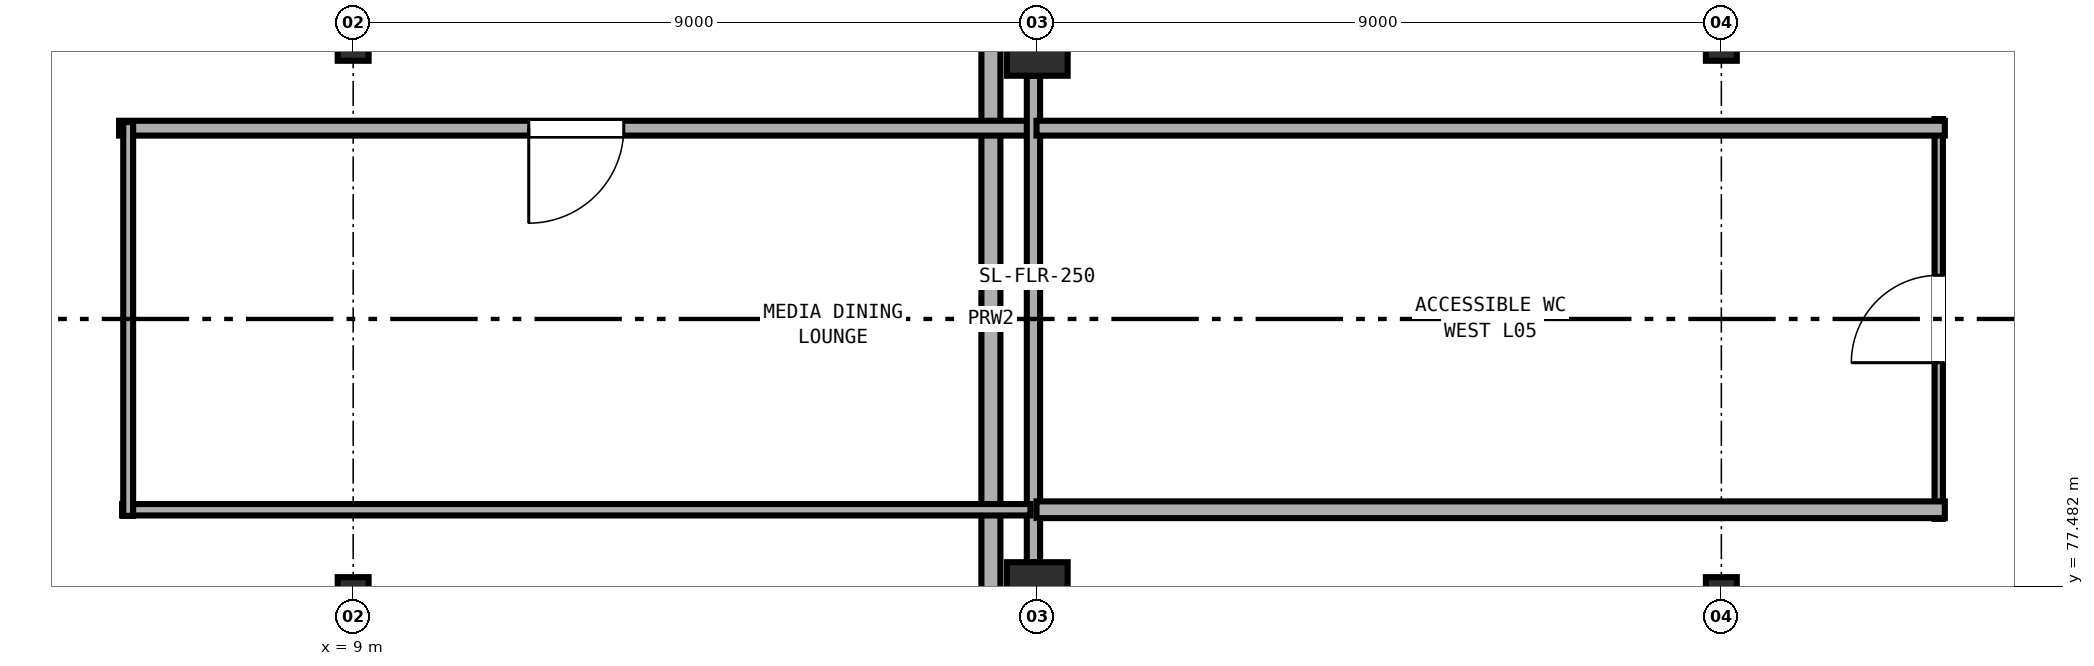
"""IFC4 building model, lengths in metres.
Left out: names, types, materials, properties, quantities, classifications, styles, units other than length and angle.
Written with IfcOpenShell. Run it as: python <this file> out.ifc"""

import sys

from ifc_helpers import new_model, si_unit, direction, frame, frame_2d, origin, origin_2d, place, context, subcontext, project, spatial, rectangle, hollow_circle, extrude, element, fill, save


model = new_model("IFC4")
c1 = context("Model", 3, precision=1e-05, world=origin(), true_north=direction((0.0, 1.0)))
c2 = subcontext(c1, "Body", "Model", "MODEL_VIEW")
j1 = project(units=[si_unit("LENGTHUNIT", "METRE"), si_unit("PLANEANGLEUNIT", "RADIAN")], contexts=[c1])
p1 = place(None, origin())
s1 = spatial("IfcSite", under=j1, at=p1, CompositionType="ELEMENT")
p2 = place(p1, origin())
s2 = spatial("IfcBuilding", under=s1, at=p2, CompositionType="ELEMENT")
p3 = place(p2, frame((0.0, 0.0, 24.0)))
s3 = spatial("IfcBuildingStorey", under=s2, at=p3, CompositionType="ELEMENT", Elevation=24.0)
for number, where, z_axis, x_axis in (
    (1, (9.0, 77.4, 0.0), (0.0, 0.0, 1.0), (1.0, 0.0, 0.0)),
    (2, (9.0, 84.6, 0.0), (0.0, 0.0, 1.0), (1.0, 0.0, 0.0)),
):
    element("IfcColumn", number, at=place(p3, frame(where, z_axis=z_axis, x_axis=x_axis)), inside=s3, PredefinedType="COLUMN", context=c2, shape_type="SweptSolid", body=[
        extrude(hollow_circle(Radius=0.203, WallThickness=0.014, at=origin_2d()), origin(), (0.0, 0.0, 1.0), 4.8),
    ])
for number, where, z_axis, x_axis in (
    (3, (18.0, 77.4, 0.0), (0.0, 0.0, 1.0), (1.0, 0.0, 0.0)),
    (4, (18.0, 84.6, 0.0), (0.0, 0.0, 1.0), (1.0, 0.0, 0.0)),
):
    element("IfcColumn", number, at=place(p3, frame(where, z_axis=z_axis, x_axis=x_axis)), inside=s3, PredefinedType="COLUMN", context=c2, shape_type="SweptSolid", body=[
        extrude(rectangle(XDim=0.8, YDim=0.8, at=origin_2d()), origin(), (0.0, 0.0, 1.0), 4.8),
    ])
for number, where, z_axis, x_axis in (
    (5, (27.0, 77.4, 0.0), (0.0, 0.0, 1.0), (1.0, 0.0, 0.0)),
    (6, (27.0, 84.6, 0.0), (0.0, 0.0, 1.0), (1.0, 0.0, 0.0)),
):
    element("IfcColumn", number, at=place(p3, frame(where, z_axis=z_axis, x_axis=x_axis)), inside=s3, PredefinedType="COLUMN", context=c2, shape_type="SweptSolid", body=[
        extrude(hollow_circle(Radius=0.203, WallThickness=0.014, at=origin_2d()), origin(), (0.0, 0.0, 1.0), 4.8),
    ])
p4 = place(p3, frame((17.39, 116.84, 4.8), z_axis=(0.0, 0.0, 1.0), x_axis=(0.0, -1.0, 0.0)))
e7 = element("IfcWall", 7, at=p4, inside=s3, PredefinedType="PARAPET", context=c2, shape_type="SweptSolid", body=[
    extrude(rectangle(XDim=71.68, YDim=0.25, at=frame_2d((35.84, 0.0))), origin(), (0.0, 0.0, 1.0), 0.65),
])
p5 = place(p3, frame((17.95, 83.51, 0.0), z_axis=(0.0, 0.0, 1.0), x_axis=(-1.0, 0.0, 0.0)))
e8 = element("IfcWall", 8, at=p5, inside=s3, PredefinedType="PARTITIONING", context=c2, shape_type="SweptSolid", body=[
    extrude(rectangle(XDim=12.03, YDim=0.195, at=frame_2d((6.015, 0.0))), origin(), (0.0, 0.0, 1.0), 3.56),
])
p6 = place(p5, frame((5.39, 0.0, 0.0)))
e9 = element("IfcOpeningElement", 9, at=p6, cuts=e8, PredefinedType="OPENING", context=c2, shape_type="SweptSolid", body=[
    extrude(rectangle(XDim=1.25, YDim=2.15, at=frame_2d((0.625, 1.075))), frame((0.0, 0.107, 0.0), z_axis=(0.0, -1.0, 0.0), x_axis=(1.0, 0.0, 0.0)), (0.0, 0.0, 1.0), 0.215),
])
p7 = place(p3, frame((17.95, 84.198, 0.0), z_axis=(0.0, 0.0, 1.0), x_axis=(0.0, -1.0, 0.0)))
e10 = element("IfcWall", 10, at=p7, inside=s3, PredefinedType="PARTITIONING", context=c2, shape_type="SweptSolid", body=[
    extrude(rectangle(XDim=6.396, YDim=0.175, at=frame_2d((3.198, 0.0))), origin(), (0.0, 0.0, 1.0), 3.56),
])
p8 = place(p3, frame((17.91, 78.49, 0.0), z_axis=(0.0, 0.0, 1.0), x_axis=(-1.0, 0.0, 0.0)))
e11 = element("IfcWall", 11, at=p8, inside=s3, PredefinedType="PARTITIONING", context=c2, shape_type="SweptSolid", body=[
    extrude(rectangle(XDim=11.95, YDim=0.15, at=frame_2d((5.975, 0.0))), origin(), (0.0, 0.0, 1.0), 3.56),
])
p9 = place(p3, frame((6.04, 78.41, 0.0), z_axis=(0.0, 0.0, 1.0), x_axis=(0.0, 1.0, 0.0)))
e12 = element("IfcWall", 12, at=p9, inside=s3, PredefinedType="PARTITIONING", context=c2, shape_type="SweptSolid", body=[
    extrude(rectangle(XDim=5.18, YDim=0.13, at=frame_2d((2.59, 0.0))), origin(), (0.0, 0.0, 1.0), 3.56),
])
p10 = place(p3, frame((29.86, 78.37, 0.0), z_axis=(0.0, 0.0, 1.0), x_axis=(0.0, 1.0, 0.0)))
e13 = element("IfcWall", 13, at=p10, inside=s3, PredefinedType="PARTITIONING", context=c2, shape_type="SweptSolid", body=[
    extrude(rectangle(XDim=5.26, YDim=0.11, at=frame_2d((2.63, 0.0))), origin(), (0.0, 0.0, 1.0), 3.56),
])
p11 = place(p10, frame((2.055, 0.0, 0.0)))
e14 = element("IfcOpeningElement", 14, at=p11, cuts=e13, PredefinedType="OPENING", context=c2, shape_type="SweptSolid", body=[
    extrude(rectangle(XDim=1.15, YDim=2.15, at=frame_2d((0.575, 1.075))), frame((0.0, 0.065, 0.0), z_axis=(0.0, -1.0, 0.0), x_axis=(1.0, 0.0, 0.0)), (0.0, 0.0, 1.0), 0.13),
])
p12 = place(p3, frame((29.94, 78.49, 0.0), z_axis=(0.0, 0.0, 1.0), x_axis=(-1.0, 0.0, 0.0)))
e15 = element("IfcWall", 15, at=p12, inside=s3, PredefinedType="PARTITIONING", context=c2, shape_type="SweptSolid", body=[
    extrude(rectangle(XDim=11.95, YDim=0.22, at=frame_2d((5.975, 0.0))), origin(), (0.0, 0.0, 1.0), 3.56),
])
p13 = place(p3, frame((17.99, 83.51, 0.0), z_axis=(0.0, 0.0, 1.0), x_axis=(1.0, 0.0, 0.0)))
e16 = element("IfcWall", 16, at=p13, inside=s3, PredefinedType="PARTITIONING", context=c2, shape_type="SweptSolid", body=[
    extrude(rectangle(XDim=11.95, YDim=0.195, at=frame_2d((5.975, 0.0))), origin(), (0.0, 0.0, 1.0), 3.56),
])
p14 = place(p6, origin())
e17 = element("IfcDoor", 17, at=p14, inside=s3, OperationType="SINGLE_SWING_RIGHT", PredefinedType="DOOR", context=c2, shape_type="SweptSolid", body=[
    extrude(rectangle(XDim=1.25, YDim=2.15, at=frame_2d((0.625, 1.075))), frame((0.0, 0.025, 0.0), z_axis=(0.0, -1.0, 0.0), x_axis=(1.0, 0.0, 0.0)), (0.0, 0.0, 1.0), 0.05),
])
fill(e9, e17)
p15 = place(p11, origin())
e18 = element("IfcDoor", 18, at=p15, inside=s3, OperationType="SINGLE_SWING_LEFT", PredefinedType="DOOR", context=c2, shape_type="SweptSolid", body=[
    extrude(rectangle(XDim=1.15, YDim=2.15, at=frame_2d((0.575, 1.075))), frame((0.0, 0.025, 0.0), z_axis=(0.0, -1.0, 0.0), x_axis=(1.0, 0.0, 0.0)), (0.0, 0.0, 1.0), 0.05),
])
fill(e14, e18)
save(model, sys.argv[1])
